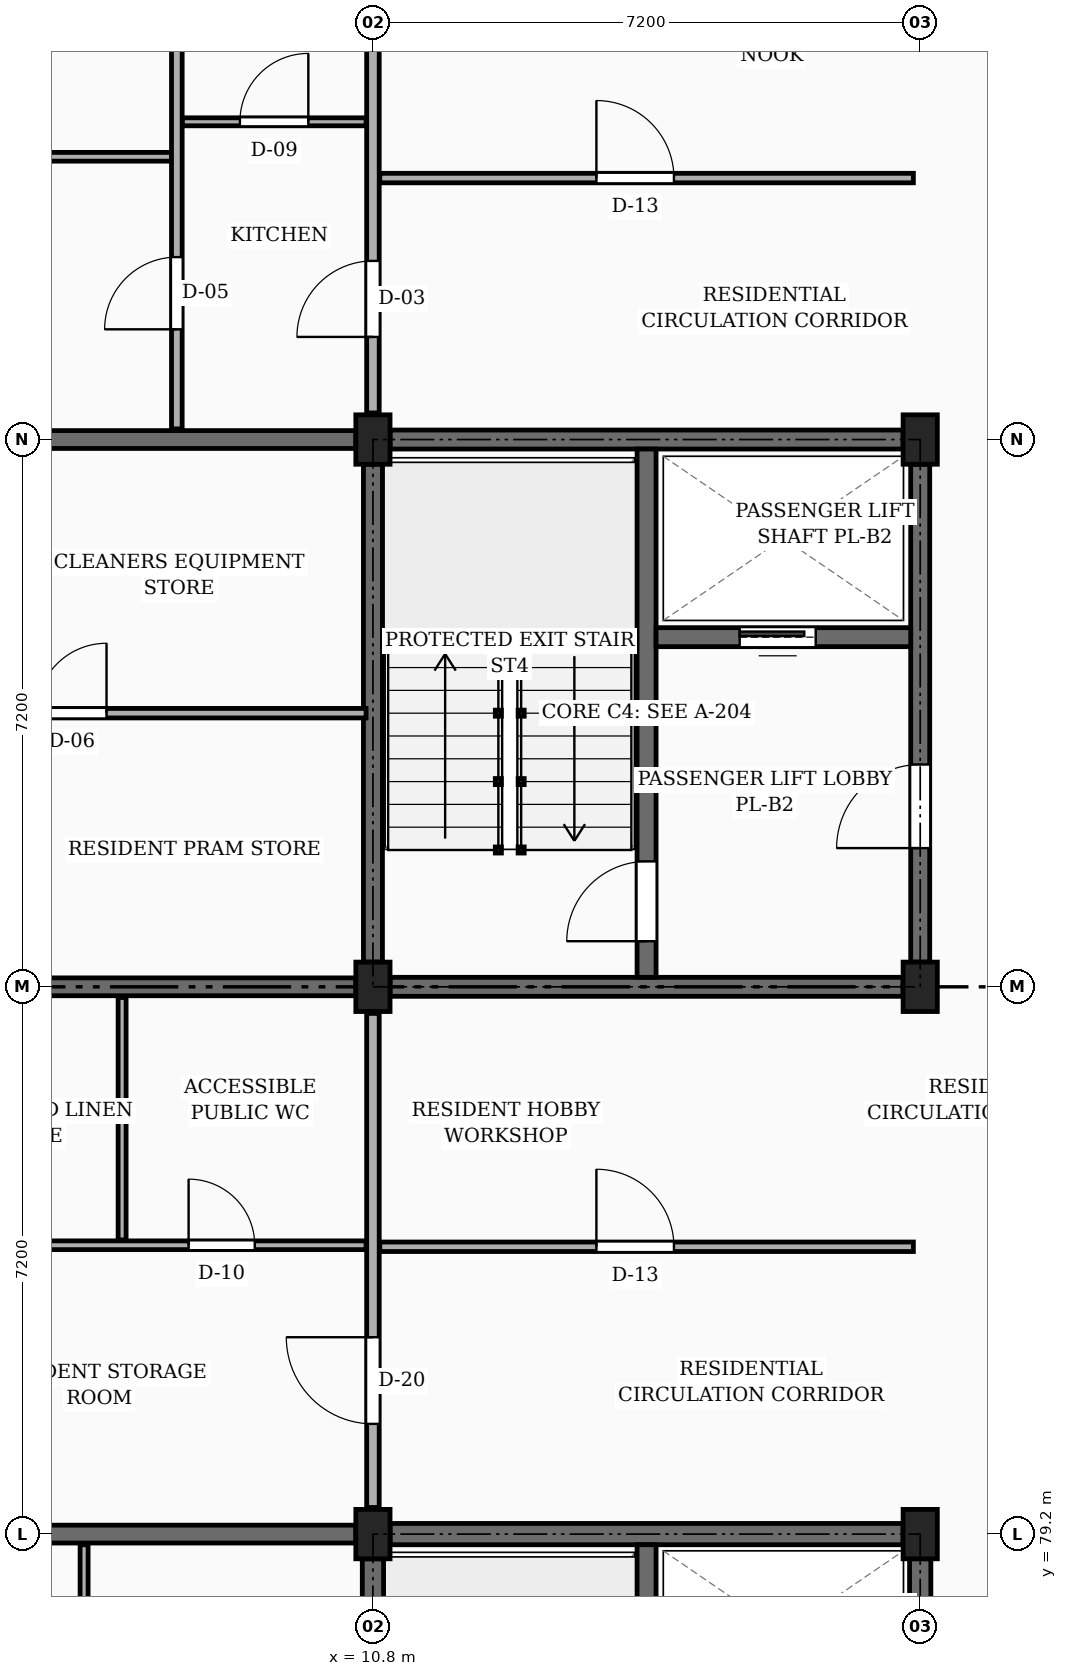
"""IFC4 building model, lengths in metres.
Left out: names, types, materials, properties, quantities, classifications, styles, units other than length and angle.
Written with IfcOpenShell. Run it as: python <this file> out.ifc"""

import sys

from ifc_helpers import new_model, si_unit, direction, frame, frame_2d, origin, origin_2d, place, context, subcontext, project, spatial, rectangle, extrude, element, fill, save


model = new_model("IFC4")
c1 = context("Model", 3, precision=1e-05, world=origin(), true_north=direction((0.0, 1.0)))
c2 = subcontext(c1, "Body", "Model", "MODEL_VIEW")
j1 = project(units=[si_unit("LENGTHUNIT", "METRE"), si_unit("PLANEANGLEUNIT", "RADIAN")], contexts=[c1])
p1 = place(None, origin())
s1 = spatial("IfcSite", under=j1, at=p1, CompositionType="ELEMENT")
p2 = place(p1, origin())
s2 = spatial("IfcBuilding", under=s1, at=p2, CompositionType="ELEMENT")
p3 = place(p2, frame((0.0, 0.0, 13.95)))
s3 = spatial("IfcBuildingStorey", under=s2, at=p3, CompositionType="ELEMENT", Elevation=13.95)
for number, where, z_axis, x_axis in (
    (1, (10.8, 79.2, 0.0), (0.0, 0.0, 1.0), (1.0, 0.0, 0.0)),
    (2, (10.8, 86.4, 0.0), (0.0, 0.0, 1.0), (1.0, 0.0, 0.0)),
    (3, (10.8, 93.6, 0.0), (0.0, 0.0, 1.0), (1.0, 0.0, 0.0)),
    (4, (18.0, 79.2, 0.0), (0.0, 0.0, 1.0), (1.0, 0.0, 0.0)),
    (5, (18.0, 86.4, 0.0), (0.0, 0.0, 1.0), (1.0, 0.0, 0.0)),
    (6, (18.0, 93.6, 0.0), (0.0, 0.0, 1.0), (1.0, 0.0, 0.0)),
):
    element("IfcColumn", number, at=place(p3, frame(where, z_axis=z_axis, x_axis=x_axis)), inside=s3, PredefinedType="COLUMN", context=c2, shape_type="SweptSolid", body=[
        extrude(rectangle(XDim=0.45, YDim=0.65, at=origin_2d()), origin(), (0.0, 0.0, 1.0), 3.15),
    ])
p4 = place(p3, frame((3.875, 79.2, 0.0), z_axis=(0.0, 0.0, 1.0), x_axis=(1.0, 0.0, 0.0)))
e7 = element("IfcWall", 7, at=p4, inside=s3, PredefinedType="SOLIDWALL", context=c2, shape_type="SweptSolid", body=[
    extrude(rectangle(XDim=6.7, YDim=0.235, at=frame_2d((3.35, 0.0))), origin(), (0.0, 0.0, 1.0), 2.21),
])
p5 = place(p3, frame((3.875, 86.4, 0.0), z_axis=(0.0, 0.0, 1.0), x_axis=(1.0, 0.0, 0.0)))
e8 = element("IfcWall", 8, at=p5, inside=s3, PredefinedType="SOLIDWALL", context=c2, shape_type="SweptSolid", body=[
    extrude(rectangle(XDim=6.7, YDim=0.235, at=frame_2d((3.35, 0.0))), origin(), (0.0, 0.0, 1.0), 2.21),
])
p6 = place(p5, frame((1.35, 0.0, 0.0)))
e9 = element("IfcOpeningElement", 9, at=p6, cuts=e8, PredefinedType="OPENING", context=c2, shape_type="SweptSolid", body=[
    extrude(rectangle(XDim=0.98, YDim=2.12, at=frame_2d((0.49, 1.06))), frame((0.0, 0.127, 0.0), z_axis=(0.0, -1.0, 0.0), x_axis=(1.0, 0.0, 0.0)), (0.0, 0.0, 1.0), 0.255),
])
p7 = place(p3, frame((3.875, 93.6, 0.0), z_axis=(0.0, 0.0, 1.0), x_axis=(1.0, 0.0, 0.0)))
e10 = element("IfcWall", 10, at=p7, inside=s3, PredefinedType="SOLIDWALL", context=c2, shape_type="SweptSolid", body=[
    extrude(rectangle(XDim=6.7, YDim=0.235, at=frame_2d((3.35, 0.0))), origin(), (0.0, 0.0, 1.0), 2.21),
])
p8 = place(p3, frame((10.8, 72.325, 0.0), z_axis=(0.0, 0.0, 1.0), x_axis=(0.0, 1.0, 0.0)))
e11 = element("IfcWall", 11, at=p8, inside=s3, PredefinedType="SHEAR", context=c2, shape_type="SweptSolid", body=[
    extrude(rectangle(XDim=6.55, YDim=0.28, at=frame_2d((3.275, 0.0))), origin(), (0.0, 0.0, 1.0), 2.91),
])
p9 = place(p3, frame((11.025, 79.2, 0.0), z_axis=(0.0, 0.0, 1.0), x_axis=(1.0, 0.0, 0.0)))
e12 = element("IfcWall", 12, at=p9, inside=s3, PredefinedType="SHEAR", context=c2, shape_type="SweptSolid", body=[
    extrude(rectangle(XDim=6.75, YDim=0.28, at=frame_2d((3.375, 0.0))), origin(), (0.0, 0.0, 1.0), 2.91),
])
p10 = place(p3, frame((18.0, 72.325, 0.0), z_axis=(0.0, 0.0, 1.0), x_axis=(0.0, 1.0, 0.0)))
e13 = element("IfcWall", 13, at=p10, inside=s3, PredefinedType="SHEAR", context=c2, shape_type="SweptSolid", body=[
    extrude(rectangle(XDim=6.55, YDim=0.28, at=frame_2d((3.275, 0.0))), origin(), (0.0, 0.0, 1.0), 2.91),
])
p11 = place(p10, frame((1.5, 0.0, 0.0)))
e14 = element("IfcOpeningElement", 14, at=p11, cuts=e13, PredefinedType="OPENING", context=c2, shape_type="SweptSolid", body=[
    extrude(rectangle(XDim=1.1, YDim=2.15, at=frame_2d((0.55, 1.075))), frame((0.0, 0.15, 0.0), z_axis=(0.0, -1.0, 0.0), x_axis=(1.0, 0.0, 0.0)), (0.0, 0.0, 1.0), 0.3),
])
p12 = place(p3, frame((14.4, 72.14, 0.0), z_axis=(0.0, 0.0, 1.0), x_axis=(0.0, 1.0, 0.0)))
e15 = element("IfcWall", 15, at=p12, inside=s3, PredefinedType="SHEAR", context=c2, shape_type="SweptSolid", body=[
    extrude(rectangle(XDim=6.92, YDim=0.25, at=frame_2d((3.46, 0.0))), origin(), (0.0, 0.0, 1.0), 2.91),
])
p13 = place(p12, frame((0.46, 0.0, 0.0)))
e16 = element("IfcOpeningElement", 16, at=p13, cuts=e15, PredefinedType="OPENING", context=c2, shape_type="SweptSolid", body=[
    extrude(rectangle(XDim=1.05, YDim=2.15, at=frame_2d((0.525, 1.075))), frame((0.0, 0.135, 0.0), z_axis=(0.0, -1.0, 0.0), x_axis=(1.0, 0.0, 0.0)), (0.0, 0.0, 1.0), 0.27),
])
p14 = place(p3, frame((10.8, 86.725, 0.0), z_axis=(0.0, 0.0, 1.0), x_axis=(0.0, 1.0, 0.0)))
e17 = element("IfcWall", 17, at=p14, inside=s3, PredefinedType="SHEAR", context=c2, shape_type="SweptSolid", body=[
    extrude(rectangle(XDim=6.55, YDim=0.25, at=frame_2d((3.275, 0.0))), origin(), (0.0, 0.0, 1.0), 2.91),
])
p15 = place(p3, frame((11.025, 93.6, 0.0), z_axis=(0.0, 0.0, 1.0), x_axis=(1.0, 0.0, 0.0)))
e18 = element("IfcWall", 18, at=p15, inside=s3, PredefinedType="SHEAR", context=c2, shape_type="SweptSolid", body=[
    extrude(rectangle(XDim=6.75, YDim=0.25, at=frame_2d((3.375, 0.0))), origin(), (0.0, 0.0, 1.0), 2.91),
])
p16 = place(p3, frame((18.0, 86.725, 0.0), z_axis=(0.0, 0.0, 1.0), x_axis=(0.0, 1.0, 0.0)))
e19 = element("IfcWall", 19, at=p16, inside=s3, PredefinedType="SHEAR", context=c2, shape_type="SweptSolid", body=[
    extrude(rectangle(XDim=6.55, YDim=0.25, at=frame_2d((3.275, 0.0))), origin(), (0.0, 0.0, 1.0), 2.91),
])
p17 = place(p16, frame((1.5, 0.0, 0.0)))
e20 = element("IfcOpeningElement", 20, at=p17, cuts=e19, PredefinedType="OPENING", context=c2, shape_type="SweptSolid", body=[
    extrude(rectangle(XDim=1.1, YDim=2.15, at=frame_2d((0.55, 1.075))), frame((0.0, 0.135, 0.0), z_axis=(0.0, -1.0, 0.0), x_axis=(1.0, 0.0, 0.0)), (0.0, 0.0, 1.0), 0.27),
])
p18 = place(p3, frame((11.025, 86.4, 0.0), z_axis=(0.0, 0.0, 1.0), x_axis=(1.0, 0.0, 0.0)))
e21 = element("IfcWall", 21, at=p18, inside=s3, PredefinedType="SHEAR", context=c2, shape_type="SweptSolid", body=[
    extrude(rectangle(XDim=6.75, YDim=0.25, at=frame_2d((3.375, 0.0))), origin(), (0.0, 0.0, 1.0), 2.91),
])
p19 = place(p3, frame((14.4, 86.525, 0.0), z_axis=(0.0, 0.0, 1.0), x_axis=(0.0, 1.0, 0.0)))
e22 = element("IfcWall", 22, at=p19, inside=s3, PredefinedType="SHEAR", context=c2, shape_type="SweptSolid", body=[
    extrude(rectangle(XDim=6.95, YDim=0.25, at=frame_2d((3.475, 0.0))), origin(), (0.0, 0.0, 1.0), 2.91),
])
p20 = place(p19, frame((0.475, 0.0, 0.0)))
e23 = element("IfcOpeningElement", 23, at=p20, cuts=e22, PredefinedType="OPENING", context=c2, shape_type="SweptSolid", body=[
    extrude(rectangle(XDim=1.05, YDim=2.15, at=frame_2d((0.525, 1.075))), frame((0.0, 0.135, 0.0), z_axis=(0.0, -1.0, 0.0), x_axis=(1.0, 0.0, 0.0)), (0.0, 0.0, 1.0), 0.27),
])
p21 = place(p3, frame((14.525, 91.0, 0.0), z_axis=(0.0, 0.0, 1.0), x_axis=(1.0, 0.0, 0.0)))
e24 = element("IfcWall", 24, at=p21, inside=s3, PredefinedType="SHEAR", context=c2, shape_type="SweptSolid", body=[
    extrude(rectangle(XDim=3.35, YDim=0.25, at=frame_2d((1.675, 0.0))), origin(), (0.0, 0.0, 1.0), 2.91),
])
p22 = place(p21, frame((1.1, 0.0, 0.0)))
e25 = element("IfcOpeningElement", 25, at=p22, cuts=e24, PredefinedType="OPENING", context=c2, shape_type="SweptSolid", body=[
    extrude(rectangle(XDim=1.0, YDim=2.2, at=frame_2d((0.5, 1.1))), frame((0.0, 0.135, 0.0), z_axis=(0.0, -1.0, 0.0), x_axis=(1.0, 0.0, 0.0)), (0.0, 0.0, 1.0), 0.27),
])
p23 = place(p3, frame((10.8, 79.55, 0.0), z_axis=(0.0, 0.0, 1.0), x_axis=(0.0, 1.0, 0.0)))
e26 = element("IfcWall", 26, at=p23, inside=s3, PredefinedType="PARTITIONING", context=c2, shape_type="SweptSolid", body=[
    extrude(rectangle(XDim=6.5, YDim=0.165, at=frame_2d((3.25, 0.0))), origin(), (0.0, 0.0, 1.0), 2.345),
])
p24 = place(p23, frame((1.1, 0.0, 0.0)))
e27 = element("IfcOpeningElement", 27, at=p24, cuts=e26, PredefinedType="OPENING", context=c2, shape_type="SweptSolid", body=[
    extrude(rectangle(XDim=1.14, YDim=2.18, at=frame_2d((0.57, 1.09))), frame((0.0, 0.093, 0.0), z_axis=(0.0, -1.0, 0.0), x_axis=(1.0, 0.0, 0.0)), (0.0, 0.0, 1.0), 0.185),
])
p25 = place(p3, frame((10.8, 93.95, 0.0), z_axis=(0.0, 0.0, 1.0), x_axis=(0.0, 1.0, 0.0)))
e28 = element("IfcWall", 28, at=p25, inside=s3, PredefinedType="PARTITIONING", context=c2, shape_type="SweptSolid", body=[
    extrude(rectangle(XDim=6.5, YDim=0.165, at=frame_2d((3.25, 0.0))), origin(), (0.0, 0.0, 1.0), 2.345),
])
p26 = place(p25, frame((1.0, 0.0, 0.0)))
e29 = element("IfcOpeningElement", 29, at=p26, cuts=e28, PredefinedType="OPENING", context=c2, shape_type="SweptSolid", body=[
    extrude(rectangle(XDim=1.0, YDim=2.15, at=frame_2d((0.5, 1.075))), frame((0.0, 0.093, 0.0), z_axis=(0.0, -1.0, 0.0), x_axis=(1.0, 0.0, 0.0)), (0.0, 0.0, 1.0), 0.185),
])
p27 = place(p3, frame((7.0, 75.37, 0.0), z_axis=(0.0, 0.0, 1.0), x_axis=(0.0, 1.0, 0.0)))
e30 = element("IfcWall", 30, at=p27, inside=s3, PredefinedType="PARTITIONING", context=c2, shape_type="SweptSolid", body=[
    extrude(rectangle(XDim=3.69, YDim=0.105, at=frame_2d((1.845, 0.0))), origin(), (0.0, 0.0, 1.0), 2.345),
])
p28 = place(p3, frame((10.89, 82.98, 0.0), z_axis=(0.0, 0.0, 1.0), x_axis=(1.0, 0.0, 0.0)))
e31 = element("IfcWall", 31, at=p28, inside=s3, PredefinedType="PARTITIONING", context=c2, shape_type="SweptSolid", body=[
    extrude(rectangle(XDim=7.02, YDim=0.125, at=frame_2d((3.51, 0.0))), origin(), (0.0, 0.0, 1.0), 2.345),
])
p29 = place(p28, frame((2.85, 0.0, 0.0)))
e32 = element("IfcOpeningElement", 32, at=p29, cuts=e31, PredefinedType="OPENING", context=c2, shape_type="SweptSolid", body=[
    extrude(rectangle(XDim=1.02, YDim=2.15, at=frame_2d((0.51, 1.075))), frame((0.0, 0.073, 0.0), z_axis=(0.0, -1.0, 0.0), x_axis=(1.0, 0.0, 0.0)), (0.0, 0.0, 1.0), 0.145),
])
p30 = place(p3, frame((3.775, 83.0, 0.0), z_axis=(0.0, 0.0, 1.0), x_axis=(1.0, 0.0, 0.0)))
e33 = element("IfcWall", 33, at=p30, inside=s3, PredefinedType="PARTITIONING", context=c2, shape_type="SweptSolid", body=[
    extrude(rectangle(XDim=6.935, YDim=0.115, at=frame_2d((3.468, 0.0))), origin(), (0.0, 0.0, 1.0), 2.345),
])
p31 = place(p30, frame((4.6, 0.0, 0.0)))
e34 = element("IfcOpeningElement", 34, at=p31, cuts=e33, PredefinedType="OPENING", context=c2, shape_type="SweptSolid", body=[
    extrude(rectangle(XDim=0.87, YDim=2.05, at=frame_2d((0.435, 1.025))), frame((0.0, 0.067, 0.0), z_axis=(0.0, -1.0, 0.0), x_axis=(1.0, 0.0, 0.0)), (0.0, 0.0, 1.0), 0.135),
])
p32 = place(p30, frame((1.2, 0.0, 0.0)))
e35 = element("IfcOpeningElement", 35, at=p32, cuts=e33, PredefinedType="OPENING", context=c2, shape_type="SweptSolid", body=[
    extrude(rectangle(XDim=0.92, YDim=2.1, at=frame_2d((0.46, 1.05))), frame((0.0, 0.067, 0.0), z_axis=(0.0, -1.0, 0.0), x_axis=(1.0, 0.0, 0.0)), (0.0, 0.0, 1.0), 0.135),
])
p33 = place(p3, frame((7.5, 83.07, 0.0), z_axis=(0.0, 0.0, 1.0), x_axis=(0.0, 1.0, 0.0)))
e36 = element("IfcWall", 36, at=p33, inside=s3, PredefinedType="PARTITIONING", context=c2, shape_type="SweptSolid", body=[
    extrude(rectangle(XDim=3.19, YDim=0.105, at=frame_2d((1.595, 0.0))), origin(), (0.0, 0.0, 1.0), 2.345),
])
p34 = place(p3, frame((3.775, 90.0, 0.0), z_axis=(0.0, 0.0, 1.0), x_axis=(1.0, 0.0, 0.0)))
e37 = element("IfcWall", 37, at=p34, inside=s3, PredefinedType="PARTITIONING", context=c2, shape_type="SweptSolid", body=[
    extrude(rectangle(XDim=6.935, YDim=0.125, at=frame_2d((3.468, 0.0))), origin(), (0.0, 0.0, 1.0), 2.345),
])
p35 = place(p34, frame((2.6, 0.0, 0.0)))
e38 = element("IfcOpeningElement", 38, at=p35, cuts=e37, PredefinedType="OPENING", context=c2, shape_type="SweptSolid", body=[
    extrude(rectangle(XDim=0.92, YDim=2.1, at=frame_2d((0.46, 1.05))), frame((0.0, 0.073, 0.0), z_axis=(0.0, -1.0, 0.0), x_axis=(1.0, 0.0, 0.0)), (0.0, 0.0, 1.0), 0.145),
])
p36 = place(p3, frame((10.89, 97.04, 0.0), z_axis=(0.0, 0.0, 1.0), x_axis=(1.0, 0.0, 0.0)))
e39 = element("IfcWall", 39, at=p36, inside=s3, PredefinedType="PARTITIONING", context=c2, shape_type="SweptSolid", body=[
    extrude(rectangle(XDim=7.02, YDim=0.125, at=frame_2d((3.51, 0.0))), origin(), (0.0, 0.0, 1.0), 2.345),
])
p37 = place(p36, frame((2.85, 0.0, 0.0)))
e40 = element("IfcOpeningElement", 40, at=p37, cuts=e39, PredefinedType="OPENING", context=c2, shape_type="SweptSolid", body=[
    extrude(rectangle(XDim=1.02, YDim=2.15, at=frame_2d((0.51, 1.075))), frame((0.0, 0.073, 0.0), z_axis=(0.0, -1.0, 0.0), x_axis=(1.0, 0.0, 0.0)), (0.0, 0.0, 1.0), 0.145),
])
p38 = place(p3, frame((3.775, 97.32, 0.0), z_axis=(0.0, 0.0, 1.0), x_axis=(1.0, 0.0, 0.0)))
e41 = element("IfcWall", 41, at=p38, inside=s3, PredefinedType="PARTITIONING", context=c2, shape_type="SweptSolid", body=[
    extrude(rectangle(XDim=4.375, YDim=0.115, at=frame_2d((2.188, 0.0))), origin(), (0.0, 0.0, 1.0), 2.345),
])
p39 = place(p38, frame((1.738, 0.0, 0.0)))
e42 = element("IfcOpeningElement", 42, at=p39, cuts=e41, PredefinedType="OPENING", context=c2, shape_type="SweptSolid", body=[
    extrude(rectangle(XDim=0.9, YDim=2.1, at=frame_2d((0.45, 1.05))), frame((0.0, 0.067, 0.0), z_axis=(0.0, -1.0, 0.0), x_axis=(1.0, 0.0, 0.0)), (0.0, 0.0, 1.0), 0.135),
])
p40 = place(p3, frame((8.29, 97.78, 0.0), z_axis=(0.0, 0.0, 1.0), x_axis=(1.0, 0.0, 0.0)))
e43 = element("IfcWall", 43, at=p40, inside=s3, PredefinedType="PARTITIONING", context=c2, shape_type="SweptSolid", body=[
    extrude(rectangle(XDim=2.42, YDim=0.105, at=frame_2d((1.21, 0.0))), origin(), (0.0, 0.0, 1.0), 2.345),
])
p41 = place(p40, frame((0.76, 0.0, 0.0)))
e44 = element("IfcOpeningElement", 44, at=p41, cuts=e43, PredefinedType="OPENING", context=c2, shape_type="SweptSolid", body=[
    extrude(rectangle(XDim=0.9, YDim=2.05, at=frame_2d((0.45, 1.025))), frame((0.0, 0.062, 0.0), z_axis=(0.0, -1.0, 0.0), x_axis=(1.0, 0.0, 0.0)), (0.0, 0.0, 1.0), 0.125),
])
p42 = place(p3, frame((8.22, 93.74, 0.0), z_axis=(0.0, 0.0, 1.0), x_axis=(0.0, 1.0, 0.0)))
e45 = element("IfcWall", 45, at=p42, inside=s3, PredefinedType="PARTITIONING", context=c2, shape_type="SweptSolid", body=[
    extrude(rectangle(XDim=6.885, YDim=0.14, at=frame_2d((3.442, 0.0))), origin(), (0.0, 0.0, 1.0), 2.345),
])
p43 = place(p42, frame((1.31, 0.0, 0.0)))
e46 = element("IfcOpeningElement", 46, at=p43, cuts=e45, PredefinedType="OPENING", context=c2, shape_type="SweptSolid", body=[
    extrude(rectangle(XDim=0.95, YDim=2.1, at=frame_2d((0.475, 1.05))), frame((0.0, 0.08, 0.0), z_axis=(0.0, -1.0, 0.0), x_axis=(1.0, 0.0, 0.0)), (0.0, 0.0, 1.0), 0.16),
])
p44 = place(p17, frame((1.1, 0.0, 0.0), z_axis=(0.0, 0.0, 1.0), x_axis=(-1.0, 0.0, 0.0)))
e47 = element("IfcDoor", 47, at=p44, inside=s3, OperationType="SINGLE_SWING_LEFT", PredefinedType="DOOR", context=c2, shape_type="SweptSolid", body=[
    extrude(rectangle(XDim=1.1, YDim=2.15, at=frame_2d((0.55, 1.075))), frame((0.0, 0.025, 0.0), z_axis=(0.0, -1.0, 0.0), x_axis=(1.0, 0.0, 0.0)), (0.0, 0.0, 1.0), 0.05),
])
fill(e20, e47)
p45 = place(p20, origin())
e48 = element("IfcDoor", 48, at=p45, inside=s3, OperationType="SINGLE_SWING_LEFT", PredefinedType="DOOR", context=c2, shape_type="SweptSolid", body=[
    extrude(rectangle(XDim=1.05, YDim=2.15, at=frame_2d((0.525, 1.075))), frame((0.0, 0.025, 0.0), z_axis=(0.0, -1.0, 0.0), x_axis=(1.0, 0.0, 0.0)), (0.0, 0.0, 1.0), 0.05),
])
fill(e23, e48)
p46 = place(p22, origin())
e49 = element("IfcDoor", 49, at=p46, inside=s3, OperationType="SLIDING_TO_LEFT", PredefinedType="DOOR", context=c2, shape_type="SweptSolid", body=[
    extrude(rectangle(XDim=1.0, YDim=2.2, at=frame_2d((0.5, 1.1))), frame((0.0, 0.025, 0.0), z_axis=(0.0, -1.0, 0.0), x_axis=(1.0, 0.0, 0.0)), (0.0, 0.0, 1.0), 0.05),
])
fill(e25, e49)
p47 = place(p24, origin())
e50 = element("IfcDoor", 50, at=p47, inside=s3, OperationType="SINGLE_SWING_RIGHT", PredefinedType="DOOR", context=c2, shape_type="SweptSolid", body=[
    extrude(rectangle(XDim=1.14, YDim=2.18, at=frame_2d((0.57, 1.09))), frame((0.0, 0.025, 0.0), z_axis=(0.0, -1.0, 0.0), x_axis=(1.0, 0.0, 0.0)), (0.0, 0.0, 1.0), 0.05),
])
fill(e27, e50)
p48 = place(p26, origin())
e51 = element("IfcDoor", 51, at=p48, inside=s3, OperationType="SINGLE_SWING_LEFT", PredefinedType="DOOR", context=c2, shape_type="SweptSolid", body=[
    extrude(rectangle(XDim=1.0, YDim=2.15, at=frame_2d((0.5, 1.075))), frame((0.0, 0.025, 0.0), z_axis=(0.0, -1.0, 0.0), x_axis=(1.0, 0.0, 0.0)), (0.0, 0.0, 1.0), 0.05),
])
fill(e29, e51)
p49 = place(p29, origin())
e52 = element("IfcDoor", 52, at=p49, inside=s3, OperationType="SINGLE_SWING_LEFT", PredefinedType="DOOR", context=c2, shape_type="SweptSolid", body=[
    extrude(rectangle(XDim=1.02, YDim=2.15, at=frame_2d((0.51, 1.075))), frame((0.0, 0.025, 0.0), z_axis=(0.0, -1.0, 0.0), x_axis=(1.0, 0.0, 0.0)), (0.0, 0.0, 1.0), 0.05),
])
fill(e32, e52)
p50 = place(p31, origin())
e53 = element("IfcDoor", 53, at=p50, inside=s3, OperationType="SINGLE_SWING_LEFT", PredefinedType="DOOR", context=c2, shape_type="SweptSolid", body=[
    extrude(rectangle(XDim=0.87, YDim=2.05, at=frame_2d((0.435, 1.025))), frame((0.0, 0.025, 0.0), z_axis=(0.0, -1.0, 0.0), x_axis=(1.0, 0.0, 0.0)), (0.0, 0.0, 1.0), 0.05),
])
fill(e34, e53)
p51 = place(p35, origin())
e54 = element("IfcDoor", 54, at=p51, inside=s3, OperationType="SINGLE_SWING_RIGHT", PredefinedType="DOOR", context=c2, shape_type="SweptSolid", body=[
    extrude(rectangle(XDim=0.92, YDim=2.1, at=frame_2d((0.46, 1.05))), frame((0.0, 0.025, 0.0), z_axis=(0.0, -1.0, 0.0), x_axis=(1.0, 0.0, 0.0)), (0.0, 0.0, 1.0), 0.05),
])
fill(e38, e54)
p52 = place(p37, origin())
e55 = element("IfcDoor", 55, at=p52, inside=s3, OperationType="SINGLE_SWING_LEFT", PredefinedType="DOOR", context=c2, shape_type="SweptSolid", body=[
    extrude(rectangle(XDim=1.02, YDim=2.15, at=frame_2d((0.51, 1.075))), frame((0.0, 0.025, 0.0), z_axis=(0.0, -1.0, 0.0), x_axis=(1.0, 0.0, 0.0)), (0.0, 0.0, 1.0), 0.05),
])
fill(e40, e55)
p53 = place(p41, origin())
e56 = element("IfcDoor", 56, at=p53, inside=s3, OperationType="SINGLE_SWING_RIGHT", PredefinedType="DOOR", context=c2, shape_type="SweptSolid", body=[
    extrude(rectangle(XDim=0.9, YDim=2.05, at=frame_2d((0.45, 1.025))), frame((0.0, 0.025, 0.0), z_axis=(0.0, -1.0, 0.0), x_axis=(1.0, 0.0, 0.0)), (0.0, 0.0, 1.0), 0.05),
])
fill(e44, e56)
p54 = place(p43, origin())
e57 = element("IfcDoor", 57, at=p54, inside=s3, OperationType="SINGLE_SWING_LEFT", PredefinedType="DOOR", context=c2, shape_type="SweptSolid", body=[
    extrude(rectangle(XDim=0.95, YDim=2.1, at=frame_2d((0.475, 1.05))), frame((0.0, 0.025, 0.0), z_axis=(0.0, -1.0, 0.0), x_axis=(1.0, 0.0, 0.0)), (0.0, 0.0, 1.0), 0.05),
])
fill(e46, e57)
save(model, sys.argv[1])
